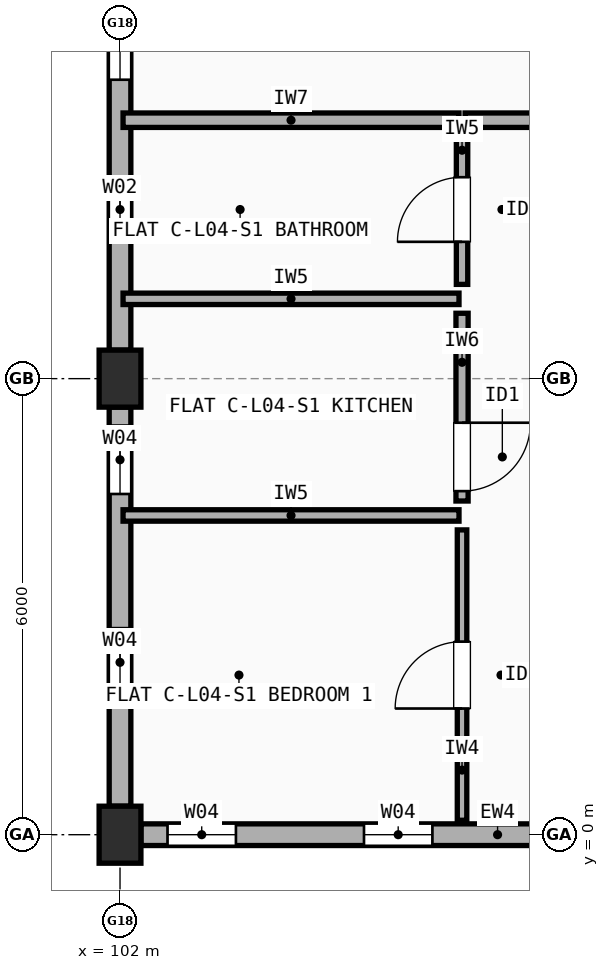
"""IFC4 building model, lengths in metres.
Left out: names, types, materials, properties, quantities, classifications, styles, units other than length and angle.
Written with IfcOpenShell. Run it as: python <this file> out.ifc"""

import sys

from ifc_helpers import new_model, si_unit, direction, frame, frame_2d, origin, origin_2d, place, context, subcontext, project, spatial, rectangle, extrude, element, fill, save


model = new_model("IFC4")
c1 = context("Model", 3, precision=1e-05, world=origin(), true_north=direction((0.0, 1.0)))
c2 = subcontext(c1, "Body", "Model", "MODEL_VIEW")
j1 = project(units=[si_unit("LENGTHUNIT", "METRE"), si_unit("PLANEANGLEUNIT", "RADIAN")], contexts=[c1])
p1 = place(None, origin())
s1 = spatial("IfcSite", under=j1, at=p1, CompositionType="ELEMENT")
p2 = place(p1, origin())
s2 = spatial("IfcBuilding", under=s1, at=p2, CompositionType="ELEMENT")
p3 = place(p2, frame((0.0, 0.0, 14.1)))
s3 = spatial("IfcBuildingStorey", under=s2, at=p3, CompositionType="ELEMENT", Elevation=14.1)
for number, where, z_axis, x_axis in (
    (1, (102.0, 0.0, 0.0), (0.0, 0.0, 1.0), (1.0, 0.0, 0.0)),
    (2, (102.0, 6.0, 0.0), (0.0, 0.0, 1.0), (1.0, 0.0, 0.0)),
):
    element("IfcColumn", number, at=place(p3, frame(where, z_axis=z_axis, x_axis=x_axis)), inside=s3, PredefinedType="COLUMN", context=c2, shape_type="SweptSolid", body=[
        extrude(rectangle(XDim=0.55, YDim=0.75, at=origin_2d()), origin(), (0.0, 0.0, 1.0), 2.95),
    ])
p4 = place(p3, frame((102.275, 0.0, 0.0), z_axis=(0.0, 0.0, 1.0), x_axis=(1.0, 0.0, 0.0)))
e3 = element("IfcWall", 3, at=p4, inside=s3, PredefinedType="STANDARD", context=c2, shape_type="SweptSolid", body=[
    extrude(rectangle(XDim=5.4, YDim=0.285, at=frame_2d((2.7, 0.0))), origin(), (0.0, 0.0, 1.0), 2.432),
])
p5 = place(p4, frame((0.35, 0.0, 0.9)))
e4 = element("IfcOpeningElement", 4, at=p5, cuts=e3, PredefinedType="OPENING", context=c2, shape_type="SweptSolid", body=[
    extrude(rectangle(XDim=0.9, YDim=1.3, at=frame_2d((0.45, 0.65))), frame((0.0, 0.152, 0.0), z_axis=(0.0, -1.0, 0.0), x_axis=(1.0, 0.0, 0.0)), (0.0, 0.0, 1.0), 0.305),
])
p6 = place(p4, frame((2.935, 0.0, 0.9)))
e5 = element("IfcOpeningElement", 5, at=p6, cuts=e3, PredefinedType="OPENING", context=c2, shape_type="SweptSolid", body=[
    extrude(rectangle(XDim=0.9, YDim=1.3, at=frame_2d((0.45, 0.65))), frame((0.0, 0.152, 0.0), z_axis=(0.0, -1.0, 0.0), x_axis=(1.0, 0.0, 0.0)), (0.0, 0.0, 1.0), 0.305),
])
p7 = place(p3, frame((102.0, 11.625, 0.0), z_axis=(0.0, 0.0, 1.0), x_axis=(0.0, -1.0, 0.0)))
e6 = element("IfcWall", 6, at=p7, inside=s3, PredefinedType="STANDARD", context=c2, shape_type="SweptSolid", body=[
    extrude(rectangle(XDim=5.25, YDim=0.285, at=frame_2d((2.625, 0.0))), origin(), (0.0, 0.0, 1.0), 2.432),
])
p8 = place(p7, frame((0.492, 0.0, 0.9)))
e7 = element("IfcOpeningElement", 7, at=p8, cuts=e6, PredefinedType="OPENING", context=c2, shape_type="SweptSolid", body=[
    extrude(rectangle(XDim=1.2, YDim=1.35, at=frame_2d((0.6, 0.675))), frame((0.0, 0.152, 0.0), z_axis=(0.0, -1.0, 0.0), x_axis=(1.0, 0.0, 0.0)), (0.0, 0.0, 1.0), 0.305),
])
p9 = place(p7, frame((3.0, 0.0, 0.9)))
e8 = element("IfcOpeningElement", 8, at=p9, cuts=e6, PredefinedType="OPENING", context=c2, shape_type="SweptSolid", body=[
    extrude(rectangle(XDim=0.8, YDim=1.2, at=frame_2d((0.4, 0.6))), frame((0.0, 0.152, 0.0), z_axis=(0.0, -1.0, 0.0), x_axis=(1.0, 0.0, 0.0)), (0.0, 0.0, 1.0), 0.305),
])
p10 = place(p3, frame((102.0, 5.625, 0.0), z_axis=(0.0, 0.0, 1.0), x_axis=(0.0, -1.0, 0.0)))
e9 = element("IfcWall", 9, at=p10, inside=s3, PredefinedType="STANDARD", context=c2, shape_type="SweptSolid", body=[
    extrude(rectangle(XDim=5.25, YDim=0.285, at=frame_2d((2.625, 0.0))), origin(), (0.0, 0.0, 1.0), 2.432),
])
p11 = place(p10, frame((0.242, 0.0, 0.9)))
e10 = element("IfcOpeningElement", 10, at=p11, cuts=e9, PredefinedType="OPENING", context=c2, shape_type="SweptSolid", body=[
    extrude(rectangle(XDim=0.9, YDim=1.3, at=frame_2d((0.45, 0.65))), frame((0.0, 0.152, 0.0), z_axis=(0.0, -1.0, 0.0), x_axis=(1.0, 0.0, 0.0)), (0.0, 0.0, 1.0), 0.305),
])
p12 = place(p10, frame((2.907, 0.0, 0.9)))
e11 = element("IfcOpeningElement", 11, at=p12, cuts=e9, PredefinedType="OPENING", context=c2, shape_type="SweptSolid", body=[
    extrude(rectangle(XDim=0.9, YDim=1.3, at=frame_2d((0.45, 0.65))), frame((0.0, 0.152, 0.0), z_axis=(0.0, -1.0, 0.0), x_axis=(1.0, 0.0, 0.0)), (0.0, 0.0, 1.0), 0.305),
])
p13 = place(p3, frame((102.04, 9.4, 0.0), z_axis=(0.0, 0.0, 1.0), x_axis=(1.0, 0.0, 0.0)))
e12 = element("IfcWall", 12, at=p13, inside=s3, PredefinedType="SOLIDWALL", context=c2, shape_type="SweptSolid", body=[
    extrude(rectangle(XDim=4.42, YDim=0.19, at=frame_2d((2.21, 0.0))), origin(), (0.0, 0.0, 1.0), 2.432),
])
p14 = place(p3, frame((106.54, 9.4, 0.0), z_axis=(0.0, 0.0, 1.0), x_axis=(1.0, 0.0, 0.0)))
e13 = element("IfcWall", 13, at=p14, inside=s3, PredefinedType="SOLIDWALL", context=c2, shape_type="SweptSolid", body=[
    extrude(rectangle(XDim=5.92, YDim=0.19, at=frame_2d((2.96, 0.0))), origin(), (0.0, 0.0, 1.0), 2.458),
])
p15 = place(p14, frame((2.47, 0.0, 0.0)))
e14 = element("IfcOpeningElement", 14, at=p15, cuts=e13, PredefinedType="OPENING", context=c2, shape_type="SweptSolid", body=[
    extrude(rectangle(XDim=0.98, YDim=2.15, at=frame_2d((0.49, 1.075))), frame((0.0, 0.105, 0.0), z_axis=(0.0, -1.0, 0.0), x_axis=(1.0, 0.0, 0.0)), (0.0, 0.0, 1.0), 0.21),
])
p16 = place(p3, frame((106.5, 0.19, 0.0), z_axis=(0.0, 0.0, 1.0), x_axis=(0.0, 1.0, 0.0)))
e15 = element("IfcWall", 15, at=p16, inside=s3, PredefinedType="PARTITIONING", context=c2, shape_type="SweptSolid", body=[
    extrude(rectangle(XDim=3.82, YDim=0.125, at=frame_2d((1.91, 0.0))), origin(), (0.0, 0.0, 1.0), 2.95),
])
p17 = place(p16, frame((1.47, 0.0, 0.0)))
e16 = element("IfcOpeningElement", 16, at=p17, cuts=e15, PredefinedType="OPENING", context=c2, shape_type="SweptSolid", body=[
    extrude(rectangle(XDim=0.88, YDim=2.1, at=frame_2d((0.44, 1.05))), frame((0.0, 0.073, 0.0), z_axis=(0.0, -1.0, 0.0), x_axis=(1.0, 0.0, 0.0)), (0.0, 0.0, 1.0), 0.145),
])
p18 = place(p3, frame((106.5, 4.39, 0.0), z_axis=(0.0, 0.0, 1.0), x_axis=(0.0, 1.0, 0.0)))
e17 = element("IfcWall", 17, at=p18, inside=s3, PredefinedType="PLUMBINGWALL", context=c2, shape_type="SweptSolid", body=[
    extrude(rectangle(XDim=2.47, YDim=0.16, at=frame_2d((1.235, 0.0))), origin(), (0.0, 0.0, 1.0), 2.432),
])
p19 = place(p18, frame((0.13, 0.0, 0.0)))
e18 = element("IfcOpeningElement", 18, at=p19, cuts=e17, PredefinedType="OPENING", context=c2, shape_type="SweptSolid", body=[
    extrude(rectangle(XDim=0.9, YDim=2.1, at=frame_2d((0.45, 1.05))), frame((0.0, 0.09, 0.0), z_axis=(0.0, -1.0, 0.0), x_axis=(1.0, 0.0, 0.0)), (0.0, 0.0, 1.0), 0.18),
])
p20 = place(p3, frame((106.5, 7.24, 0.0), z_axis=(0.0, 0.0, 1.0), x_axis=(0.0, 1.0, 0.0)))
e19 = element("IfcWall", 19, at=p20, inside=s3, PredefinedType="PARTITIONING", context=c2, shape_type="SweptSolid", body=[
    extrude(rectangle(XDim=1.97, YDim=0.15, at=frame_2d((0.985, 0.0))), origin(), (0.0, 0.0, 1.0), 2.95),
])
p21 = place(p20, frame((0.56, 0.0, 0.0)))
e20 = element("IfcOpeningElement", 20, at=p21, cuts=e19, PredefinedType="OPENING", context=c2, shape_type="SweptSolid", body=[
    extrude(rectangle(XDim=0.85, YDim=2.1, at=frame_2d((0.425, 1.05))), frame((0.0, 0.085, 0.0), z_axis=(0.0, -1.0, 0.0), x_axis=(1.0, 0.0, 0.0)), (0.0, 0.0, 1.0), 0.17),
])
for number, where, z_axis, x_axis in (
    (21, (102.04, 4.2, 0.0), (0.0, 0.0, 1.0), (1.0, 0.0, 0.0)),
    (22, (102.04, 7.05, 0.0), (0.0, 0.0, 1.0), (1.0, 0.0, 0.0)),
):
    element("IfcWall", number, at=place(p3, frame(where, z_axis=z_axis, x_axis=x_axis)), inside=s3, PredefinedType="PARTITIONING", context=c2, shape_type="SweptSolid", body=[
        extrude(rectangle(XDim=4.42, YDim=0.15, at=frame_2d((2.21, 0.0))), origin(), (0.0, 0.0, 1.0), 2.432),
    ])
p22 = place(p5, origin())
e23 = element("IfcWindow", 23, at=p22, inside=s3, PartitioningType="SINGLE_PANEL", PredefinedType="WINDOW", context=c2, shape_type="SweptSolid", body=[
    extrude(rectangle(XDim=0.9, YDim=1.3, at=frame_2d((0.45, 0.65))), frame((0.0, 0.03, 0.0), z_axis=(0.0, -1.0, 0.0), x_axis=(1.0, 0.0, 0.0)), (0.0, 0.0, 1.0), 0.06),
])
fill(e4, e23)
p23 = place(p6, origin())
e24 = element("IfcWindow", 24, at=p23, inside=s3, PartitioningType="SINGLE_PANEL", PredefinedType="WINDOW", context=c2, shape_type="SweptSolid", body=[
    extrude(rectangle(XDim=0.9, YDim=1.3, at=frame_2d((0.45, 0.65))), frame((0.0, 0.03, 0.0), z_axis=(0.0, -1.0, 0.0), x_axis=(1.0, 0.0, 0.0)), (0.0, 0.0, 1.0), 0.06),
])
fill(e5, e24)
p24 = place(p8, origin())
e25 = element("IfcWindow", 25, at=p24, inside=s3, PartitioningType="SINGLE_PANEL", PredefinedType="WINDOW", context=c2, shape_type="SweptSolid", body=[
    extrude(rectangle(XDim=1.2, YDim=1.35, at=frame_2d((0.6, 0.675))), frame((0.0, 0.03, 0.0), z_axis=(0.0, -1.0, 0.0), x_axis=(1.0, 0.0, 0.0)), (0.0, 0.0, 1.0), 0.06),
])
fill(e7, e25)
p25 = place(p9, origin())
e26 = element("IfcWindow", 26, at=p25, inside=s3, PartitioningType="SINGLE_PANEL", PredefinedType="WINDOW", context=c2, shape_type="SweptSolid", body=[
    extrude(rectangle(XDim=0.8, YDim=1.2, at=frame_2d((0.4, 0.6))), frame((0.0, 0.03, 0.0), z_axis=(0.0, -1.0, 0.0), x_axis=(1.0, 0.0, 0.0)), (0.0, 0.0, 1.0), 0.06),
])
fill(e8, e26)
p26 = place(p11, origin())
e27 = element("IfcWindow", 27, at=p26, inside=s3, PartitioningType="SINGLE_PANEL", PredefinedType="WINDOW", context=c2, shape_type="SweptSolid", body=[
    extrude(rectangle(XDim=0.9, YDim=1.3, at=frame_2d((0.45, 0.65))), frame((0.0, 0.03, 0.0), z_axis=(0.0, -1.0, 0.0), x_axis=(1.0, 0.0, 0.0)), (0.0, 0.0, 1.0), 0.06),
])
fill(e10, e27)
p27 = place(p12, origin())
e28 = element("IfcWindow", 28, at=p27, inside=s3, PartitioningType="SINGLE_PANEL", PredefinedType="WINDOW", context=c2, shape_type="SweptSolid", body=[
    extrude(rectangle(XDim=0.9, YDim=1.3, at=frame_2d((0.45, 0.65))), frame((0.0, 0.03, 0.0), z_axis=(0.0, -1.0, 0.0), x_axis=(1.0, 0.0, 0.0)), (0.0, 0.0, 1.0), 0.06),
])
fill(e11, e28)
p28 = place(p17, origin())
e29 = element("IfcDoor", 29, at=p28, inside=s3, OperationType="SINGLE_SWING_LEFT", PredefinedType="DOOR", context=c2, shape_type="SweptSolid", body=[
    extrude(rectangle(XDim=0.88, YDim=2.1, at=frame_2d((0.44, 1.05))), frame((0.0, 0.025, 0.0), z_axis=(0.0, -1.0, 0.0), x_axis=(1.0, 0.0, 0.0)), (0.0, 0.0, 1.0), 0.05),
])
fill(e16, e29)
p29 = place(p19, origin())
e30 = element("IfcDoor", 30, at=p29, inside=s3, OperationType="SINGLE_SWING_RIGHT", PredefinedType="DOOR", context=c2, shape_type="SweptSolid", body=[
    extrude(rectangle(XDim=0.9, YDim=2.1, at=frame_2d((0.45, 1.05))), frame((0.0, 0.025, 0.0), z_axis=(0.0, -1.0, 0.0), x_axis=(1.0, 0.0, 0.0)), (0.0, 0.0, 1.0), 0.05),
])
fill(e18, e30)
p30 = place(p21, origin())
e31 = element("IfcDoor", 31, at=p30, inside=s3, OperationType="SINGLE_SWING_LEFT", PredefinedType="DOOR", context=c2, shape_type="SweptSolid", body=[
    extrude(rectangle(XDim=0.85, YDim=2.1, at=frame_2d((0.425, 1.05))), frame((0.0, 0.025, 0.0), z_axis=(0.0, -1.0, 0.0), x_axis=(1.0, 0.0, 0.0)), (0.0, 0.0, 1.0), 0.05),
])
fill(e20, e31)
save(model, sys.argv[1])
